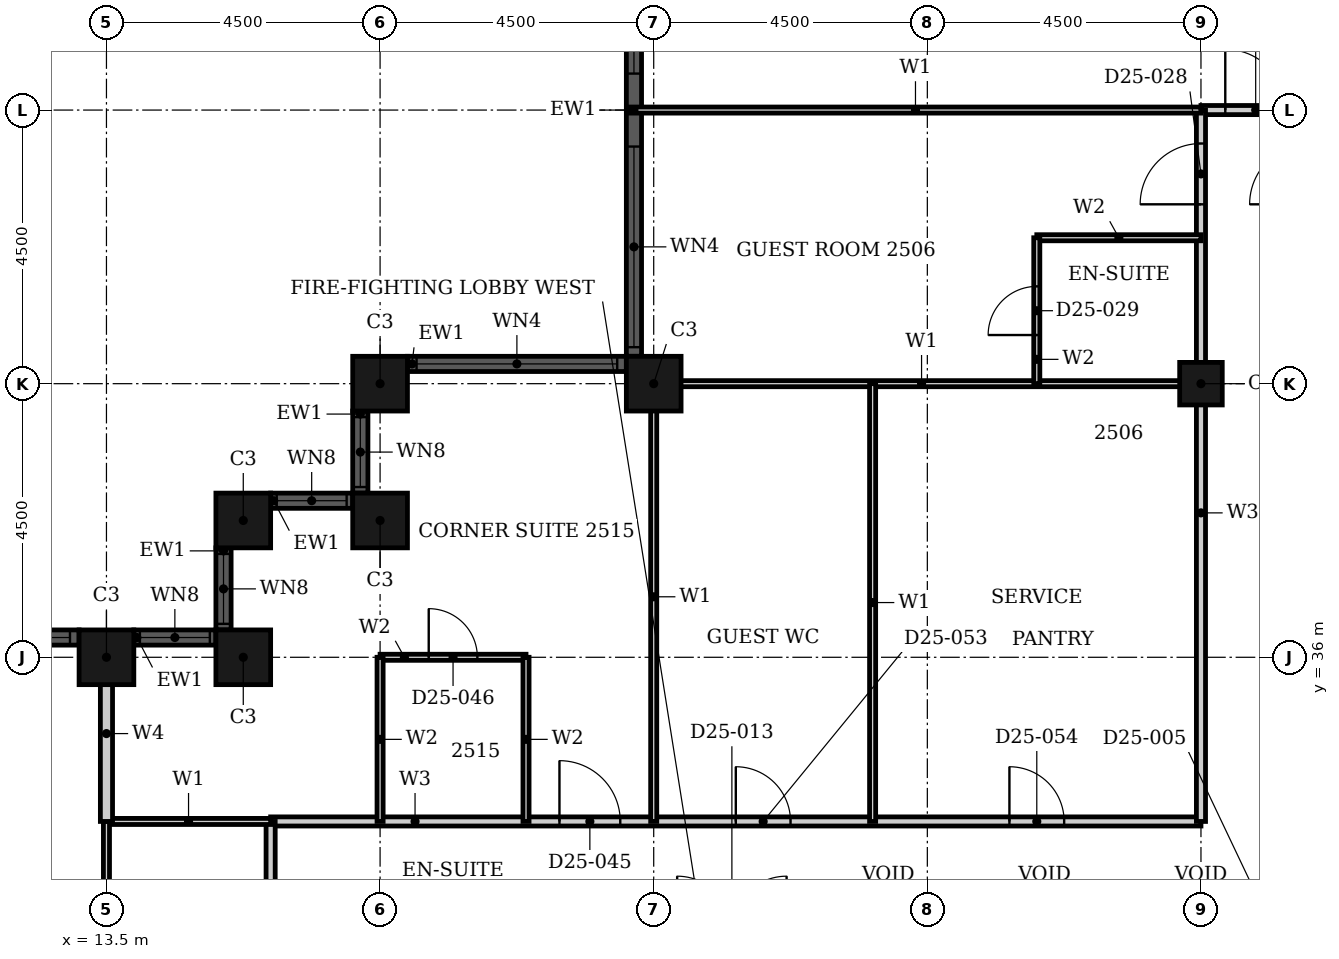
"""IFC4 building model, lengths in metres.
Left out: names, types, materials, properties, quantities, classifications, styles, units other than length and angle.
Written with IfcOpenShell. Run it as: python <this file> out.ifc"""

import sys

from ifc_helpers import new_model, si_unit, direction, frame, frame_2d, origin, origin_2d, place, context, subcontext, project, spatial, rectangle, hollow_rectangle, extrude, element, fill, save


model = new_model("IFC4")
c1 = context("Model", 3, precision=1e-05, world=origin(), true_north=direction((0.0, 1.0)))
c2 = subcontext(c1, "Body", "Model", "MODEL_VIEW")
j1 = project(units=[si_unit("LENGTHUNIT", "METRE"), si_unit("PLANEANGLEUNIT", "RADIAN")], contexts=[c1])
p1 = place(None, origin())
s1 = spatial("IfcSite", under=j1, at=p1, CompositionType="ELEMENT")
p2 = place(p1, origin())
s2 = spatial("IfcBuilding", under=s1, at=p2, CompositionType="ELEMENT")
p3 = place(p2, frame((0.0, 0.0, 104.4)))
s3 = spatial("IfcBuildingStorey", under=s2, at=p3, CompositionType="ELEMENT", Elevation=104.4)
for number, where, z_axis, x_axis in (
    (1, (22.5, 40.5, 0.0), (0.0, 0.0, 1.0), (1.0, 0.0, 0.0)),
    (2, (18.0, 40.5, 0.0), (0.0, 0.0, 1.0), (1.0, 0.0, 0.0)),
    (3, (18.0, 38.25, 0.0), (0.0, 0.0, 1.0), (1.0, 0.0, 0.0)),
    (4, (15.75, 38.25, 0.0), (0.0, 0.0, 1.0), (1.0, 0.0, 0.0)),
    (5, (15.75, 36.0, 0.0), (0.0, 0.0, 1.0), (1.0, 0.0, 0.0)),
    (6, (13.5, 36.0, 0.0), (0.0, 0.0, 1.0), (1.0, 0.0, 0.0)),
):
    element("IfcColumn", number, at=place(p3, frame(where, z_axis=z_axis, x_axis=x_axis)), inside=s3, PredefinedType="COLUMN", context=c2, shape_type="SweptSolid", body=[
        extrude(hollow_rectangle(XDim=0.9, YDim=0.9, WallThickness=0.028, at=origin_2d()), origin(), (0.0, 0.0, 1.0), 3.6),
    ])
p4 = place(p3, frame((31.5, 40.5, 0.0), z_axis=(0.0, 0.0, 1.0), x_axis=(1.0, 0.0, 0.0)))
e7 = element("IfcColumn", 7, at=p4, inside=s3, PredefinedType="COLUMN", context=c2, shape_type="SweptSolid", body=[
    extrude(hollow_rectangle(XDim=0.7, YDim=0.7, WallThickness=0.022, at=origin_2d()), origin(), (0.0, 0.0, 1.0), 3.6),
])
p5 = place(p3, frame((22.175, 49.05, 0.0), z_axis=(0.0, 0.0, 1.0), x_axis=(0.0, -1.0, 0.0)))
e8 = element("IfcWall", 8, at=p5, inside=s3, PredefinedType="SOLIDWALL", context=c2, shape_type="SweptSolid", body=[
    extrude(rectangle(XDim=8.1, YDim=0.25, at=frame_2d((4.05, 0.0))), origin(), (0.0, 0.0, 1.0), 3.6),
])
p6 = place(p5, frame((0.15, 0.0, 0.9)))
e9 = element("IfcOpeningElement", 9, at=p6, cuts=e8, PredefinedType="OPENING", context=c2, shape_type="SweptSolid", body=[
    extrude(rectangle(XDim=3.3, YDim=2.08, at=frame_2d((1.65, 1.04))), frame((0.0, 0.135, 0.0), z_axis=(0.0, -1.0, 0.0), x_axis=(1.0, 0.0, 0.0)), (0.0, 0.0, 1.0), 0.27),
])
p7 = place(p5, frame((4.65, 0.0, 0.9)))
e10 = element("IfcOpeningElement", 10, at=p7, cuts=e8, PredefinedType="OPENING", context=c2, shape_type="SweptSolid", body=[
    extrude(rectangle(XDim=3.3, YDim=2.08, at=frame_2d((1.65, 1.04))), frame((0.0, 0.135, 0.0), z_axis=(0.0, -1.0, 0.0), x_axis=(1.0, 0.0, 0.0)), (0.0, 0.0, 1.0), 0.27),
])
p8 = place(p3, frame((22.05, 40.825, 0.0), z_axis=(0.0, 0.0, 1.0), x_axis=(-1.0, 0.0, 0.0)))
e11 = element("IfcWall", 11, at=p8, inside=s3, PredefinedType="SOLIDWALL", context=c2, shape_type="SweptSolid", body=[
    extrude(rectangle(XDim=3.6, YDim=0.25, at=frame_2d((1.8, 0.0))), origin(), (0.0, 0.0, 1.0), 3.6),
])
p9 = place(p8, frame((0.15, 0.0, 0.9)))
e12 = element("IfcOpeningElement", 12, at=p9, cuts=e11, PredefinedType="OPENING", context=c2, shape_type="SweptSolid", body=[
    extrude(rectangle(XDim=3.3, YDim=2.08, at=frame_2d((1.65, 1.04))), frame((0.0, 0.135, 0.0), z_axis=(0.0, -1.0, 0.0), x_axis=(1.0, 0.0, 0.0)), (0.0, 0.0, 1.0), 0.27),
])
p10 = place(p3, frame((17.675, 40.05, 0.0), z_axis=(0.0, 0.0, 1.0), x_axis=(0.0, -1.0, 0.0)))
e13 = element("IfcWall", 13, at=p10, inside=s3, PredefinedType="SOLIDWALL", context=c2, shape_type="SweptSolid", body=[
    extrude(rectangle(XDim=1.35, YDim=0.25, at=frame_2d((0.675, 0.0))), origin(), (0.0, 0.0, 1.0), 3.6),
])
p11 = place(p10, frame((0.1, 0.0, 0.9)))
e14 = element("IfcOpeningElement", 14, at=p11, cuts=e13, PredefinedType="OPENING", context=c2, shape_type="SweptSolid", body=[
    extrude(rectangle(XDim=1.15, YDim=2.08, at=frame_2d((0.575, 1.04))), frame((0.0, 0.135, 0.0), z_axis=(0.0, -1.0, 0.0), x_axis=(1.0, 0.0, 0.0)), (0.0, 0.0, 1.0), 0.27),
])
p12 = place(p3, frame((17.55, 38.575, 0.0), z_axis=(0.0, 0.0, 1.0), x_axis=(-1.0, 0.0, 0.0)))
e15 = element("IfcWall", 15, at=p12, inside=s3, PredefinedType="SOLIDWALL", context=c2, shape_type="SweptSolid", body=[
    extrude(rectangle(XDim=1.35, YDim=0.25, at=frame_2d((0.675, 0.0))), origin(), (0.0, 0.0, 1.0), 3.6),
])
p13 = place(p12, frame((0.1, 0.0, 0.9)))
e16 = element("IfcOpeningElement", 16, at=p13, cuts=e15, PredefinedType="OPENING", context=c2, shape_type="SweptSolid", body=[
    extrude(rectangle(XDim=1.15, YDim=2.08, at=frame_2d((0.575, 1.04))), frame((0.0, 0.135, 0.0), z_axis=(0.0, -1.0, 0.0), x_axis=(1.0, 0.0, 0.0)), (0.0, 0.0, 1.0), 0.27),
])
p14 = place(p3, frame((15.425, 37.8, 0.0), z_axis=(0.0, 0.0, 1.0), x_axis=(0.0, -1.0, 0.0)))
e17 = element("IfcWall", 17, at=p14, inside=s3, PredefinedType="SOLIDWALL", context=c2, shape_type="SweptSolid", body=[
    extrude(rectangle(XDim=1.35, YDim=0.25, at=frame_2d((0.675, 0.0))), origin(), (0.0, 0.0, 1.0), 3.6),
])
p15 = place(p14, frame((0.1, 0.0, 0.9)))
e18 = element("IfcOpeningElement", 18, at=p15, cuts=e17, PredefinedType="OPENING", context=c2, shape_type="SweptSolid", body=[
    extrude(rectangle(XDim=1.15, YDim=2.08, at=frame_2d((0.575, 1.04))), frame((0.0, 0.135, 0.0), z_axis=(0.0, -1.0, 0.0), x_axis=(1.0, 0.0, 0.0)), (0.0, 0.0, 1.0), 0.27),
])
p16 = place(p3, frame((15.3, 36.325, 0.0), z_axis=(0.0, 0.0, 1.0), x_axis=(-1.0, 0.0, 0.0)))
e19 = element("IfcWall", 19, at=p16, inside=s3, PredefinedType="SOLIDWALL", context=c2, shape_type="SweptSolid", body=[
    extrude(rectangle(XDim=1.35, YDim=0.25, at=frame_2d((0.675, 0.0))), origin(), (0.0, 0.0, 1.0), 3.6),
])
p17 = place(p16, frame((0.1, 0.0, 0.9)))
e20 = element("IfcOpeningElement", 20, at=p17, cuts=e19, PredefinedType="OPENING", context=c2, shape_type="SweptSolid", body=[
    extrude(rectangle(XDim=1.15, YDim=2.08, at=frame_2d((0.575, 1.04))), frame((0.0, 0.135, 0.0), z_axis=(0.0, -1.0, 0.0), x_axis=(1.0, 0.0, 0.0)), (0.0, 0.0, 1.0), 0.27),
])
p18 = place(p3, frame((13.05, 36.325, 0.0), z_axis=(0.0, 0.0, 1.0), x_axis=(-1.0, 0.0, 0.0)))
e21 = element("IfcWall", 21, at=p18, inside=s3, PredefinedType="SOLIDWALL", context=c2, shape_type="SweptSolid", body=[
    extrude(rectangle(XDim=8.1, YDim=0.25, at=frame_2d((4.05, 0.0))), origin(), (0.0, 0.0, 1.0), 3.6),
])
p19 = place(p18, frame((0.15, 0.0, 0.9)))
e22 = element("IfcOpeningElement", 22, at=p19, cuts=e21, PredefinedType="OPENING", context=c2, shape_type="SweptSolid", body=[
    extrude(rectangle(XDim=3.3, YDim=2.08, at=frame_2d((1.65, 1.04))), frame((0.0, 0.135, 0.0), z_axis=(0.0, -1.0, 0.0), x_axis=(1.0, 0.0, 0.0)), (0.0, 0.0, 1.0), 0.27),
])
p20 = place(p18, frame((4.65, 0.0, 0.9)))
e23 = element("IfcOpeningElement", 23, at=p20, cuts=e21, PredefinedType="OPENING", context=c2, shape_type="SweptSolid", body=[
    extrude(rectangle(XDim=3.3, YDim=2.08, at=frame_2d((1.65, 1.04))), frame((0.0, 0.135, 0.0), z_axis=(0.0, -1.0, 0.0), x_axis=(1.0, 0.0, 0.0)), (0.0, 0.0, 1.0), 0.27),
])
p21 = place(p3, frame((16.2, 33.3, 0.0), z_axis=(0.0, 0.0, 1.0), x_axis=(1.0, 0.0, 0.0)))
e24 = element("IfcWall", 24, at=p21, inside=s3, PredefinedType="PARTITIONING", context=c2, shape_type="SweptSolid", body=[
    extrude(rectangle(XDim=15.3, YDim=0.15, at=frame_2d((7.65, 0.0))), origin(), (0.0, 0.0, 1.0), 3.3),
])
p22 = place(p21, frame((4.75, 0.0, 0.0)))
e25 = element("IfcOpeningElement", 25, at=p22, cuts=e24, PredefinedType="OPENING", context=c2, shape_type="SweptSolid", body=[
    extrude(rectangle(XDim=1.0, YDim=2.1, at=frame_2d((0.5, 1.05))), frame((0.0, 0.085, 0.0), z_axis=(0.0, -1.0, 0.0), x_axis=(1.0, 0.0, 0.0)), (0.0, 0.0, 1.0), 0.17),
])
p23 = place(p21, frame((7.65, 0.0, 0.0)))
e26 = element("IfcOpeningElement", 26, at=p23, cuts=e24, PredefinedType="OPENING", context=c2, shape_type="SweptSolid", body=[
    extrude(rectangle(XDim=0.9, YDim=2.1, at=frame_2d((0.45, 1.05))), frame((0.0, 0.085, 0.0), z_axis=(0.0, -1.0, 0.0), x_axis=(1.0, 0.0, 0.0)), (0.0, 0.0, 1.0), 0.17),
])
p24 = place(p21, frame((12.15, 0.0, 0.0)))
e27 = element("IfcOpeningElement", 27, at=p24, cuts=e24, PredefinedType="OPENING", context=c2, shape_type="SweptSolid", body=[
    extrude(rectangle(XDim=0.9, YDim=2.1, at=frame_2d((0.45, 1.05))), frame((0.0, 0.085, 0.0), z_axis=(0.0, -1.0, 0.0), x_axis=(1.0, 0.0, 0.0)), (0.0, 0.0, 1.0), 0.17),
])
p25 = place(p3, frame((31.5, 45.0, 0.0), z_axis=(0.0, 0.0, 1.0), x_axis=(1.0, 0.0, 0.0)))
e28 = element("IfcWall", 28, at=p25, inside=s3, PredefinedType="PARTITIONING", context=c2, shape_type="SweptSolid", body=[
    extrude(rectangle(XDim=1.8, YDim=0.15, at=frame_2d((0.9, 0.0))), origin(), (0.0, 0.0, 1.0), 3.3),
])
p26 = place(p25, frame((0.4, 0.0, 0.0)))
e29 = element("IfcOpeningElement", 29, at=p26, cuts=e28, PredefinedType="OPENING", context=c2, shape_type="SweptSolid", body=[
    extrude(rectangle(XDim=1.0, YDim=2.1, at=frame_2d((0.5, 1.05))), frame((0.0, 0.085, 0.0), z_axis=(0.0, -1.0, 0.0), x_axis=(1.0, 0.0, 0.0)), (0.0, 0.0, 1.0), 0.17),
])
p27 = place(p3, frame((16.2, 27.0, 0.0), z_axis=(0.0, 0.0, 1.0), x_axis=(0.0, 1.0, 0.0)))
e30 = element("IfcWall", 30, at=p27, inside=s3, PredefinedType="PARTITIONING", context=c2, shape_type="SweptSolid", body=[
    extrude(rectangle(XDim=6.3, YDim=0.15, at=frame_2d((3.15, 0.0))), origin(), (0.0, 0.0, 1.0), 3.3),
])
p28 = place(p27, frame((2.55, 0.0, 0.0)))
e31 = element("IfcOpeningElement", 31, at=p28, cuts=e30, PredefinedType="OPENING", context=c2, shape_type="SweptSolid", body=[
    extrude(rectangle(XDim=0.9, YDim=2.1, at=frame_2d((0.45, 1.05))), frame((0.0, 0.085, 0.0), z_axis=(0.0, -1.0, 0.0), x_axis=(1.0, 0.0, 0.0)), (0.0, 0.0, 1.0), 0.17),
])
p29 = place(p3, frame((31.5, 33.3, 0.0), z_axis=(0.0, 0.0, 1.0), x_axis=(0.0, 1.0, 0.0)))
e32 = element("IfcWall", 32, at=p29, inside=s3, PredefinedType="PARTITIONING", context=c2, shape_type="SweptSolid", body=[
    extrude(rectangle(XDim=11.7, YDim=0.15, at=frame_2d((5.85, 0.0))), origin(), (0.0, 0.0, 1.0), 2.58),
])
p30 = place(p29, frame((10.15, 0.0, 0.0)))
e33 = element("IfcOpeningElement", 33, at=p30, cuts=e32, PredefinedType="OPENING", context=c2, shape_type="SweptSolid", body=[
    extrude(rectangle(XDim=1.0, YDim=2.1, at=frame_2d((0.5, 1.05))), frame((0.0, 0.085, 0.0), z_axis=(0.0, -1.0, 0.0), x_axis=(1.0, 0.0, 0.0)), (0.0, 0.0, 1.0), 0.17),
])
p31 = place(p3, frame((13.5, 33.3, 0.0), z_axis=(0.0, 0.0, 1.0), x_axis=(1.0, 0.0, 0.0)))
e34 = element("IfcWall", 34, at=p31, inside=s3, PredefinedType="PARTITIONING", context=c2, shape_type="SweptSolid", body=[
    extrude(rectangle(XDim=2.7, YDim=0.1, at=frame_2d((1.35, 0.0))), origin(), (0.0, 0.0, 1.0), 3.3),
])
p32 = place(p3, frame((22.31, 40.5, 0.0), z_axis=(0.0, 0.0, 1.0), x_axis=(1.0, 0.0, 0.0)))
e35 = element("IfcWall", 35, at=p32, inside=s3, PredefinedType="PARTITIONING", context=c2, shape_type="SweptSolid", body=[
    extrude(rectangle(XDim=9.19, YDim=0.1, at=frame_2d((4.595, 0.0))), origin(), (0.0, 0.0, 1.0), 2.38),
])
p33 = place(p3, frame((22.11, 45.0, 0.0), z_axis=(0.0, 0.0, 1.0), x_axis=(1.0, 0.0, 0.0)))
e36 = element("IfcWall", 36, at=p33, inside=s3, PredefinedType="PARTITIONING", context=c2, shape_type="SweptSolid", body=[
    extrude(rectangle(XDim=9.39, YDim=0.1, at=frame_2d((4.695, 0.0))), origin(), (0.0, 0.0, 1.0), 3.3),
])
p34 = place(p3, frame((13.5, 27.0, 0.0), z_axis=(0.0, 0.0, 1.0), x_axis=(0.0, 1.0, 0.0)))
e37 = element("IfcWall", 37, at=p34, inside=s3, PredefinedType="PARTITIONING", context=c2, shape_type="SweptSolid", body=[
    extrude(rectangle(XDim=6.3, YDim=0.1, at=frame_2d((3.15, 0.0))), origin(), (0.0, 0.0, 1.0), 2.38),
])
p35 = place(p3, frame((22.5, 33.3, 0.0), z_axis=(0.0, 0.0, 1.0), x_axis=(0.0, 1.0, 0.0)))
e38 = element("IfcWall", 38, at=p35, inside=s3, PredefinedType="PARTITIONING", context=c2, shape_type="SweptSolid", body=[
    extrude(rectangle(XDim=7.39, YDim=0.1, at=frame_2d((3.695, 0.0))), origin(), (0.0, 0.0, 1.0), 3.3),
])
p36 = place(p3, frame((26.1, 33.3, 0.0), z_axis=(0.0, 0.0, 1.0), x_axis=(0.0, 1.0, 0.0)))
e39 = element("IfcWall", 39, at=p36, inside=s3, PredefinedType="PARTITIONING", context=c2, shape_type="SweptSolid", body=[
    extrude(rectangle(XDim=7.2, YDim=0.1, at=frame_2d((3.6, 0.0))), origin(), (0.0, 0.0, 1.0), 3.3),
])
p37 = place(p3, frame((13.5, 33.3, 0.0), z_axis=(0.0, 0.0, 1.0), x_axis=(0.0, 1.0, 0.0)))
e40 = element("IfcWall", 40, at=p37, inside=s3, PredefinedType="PARTITIONING", context=c2, shape_type="SweptSolid", body=[
    extrude(rectangle(XDim=2.89, YDim=0.2, at=frame_2d((1.445, 0.0))), origin(), (0.0, 0.0, 1.0), 2.38),
])
p38 = place(p3, frame((18.0, 36.0, 0.0), z_axis=(0.0, 0.0, 1.0), x_axis=(1.0, 0.0, 0.0)))
e41 = element("IfcWall", 41, at=p38, inside=s3, PredefinedType="PARTITIONING", context=c2, shape_type="SweptSolid", body=[
    extrude(rectangle(XDim=2.4, YDim=0.1, at=frame_2d((1.2, 0.0))), origin(), (0.0, 0.0, 1.0), 3.3),
])
p39 = place(p38, frame((0.8, 0.0, 0.0)))
e42 = element("IfcOpeningElement", 42, at=p39, cuts=e41, PredefinedType="OPENING", context=c2, shape_type="SweptSolid", body=[
    extrude(rectangle(XDim=0.8, YDim=2.1, at=frame_2d((0.4, 1.05))), frame((0.0, 0.06, 0.0), z_axis=(0.0, -1.0, 0.0), x_axis=(1.0, 0.0, 0.0)), (0.0, 0.0, 1.0), 0.12),
])
for number, where, z_axis, x_axis in (
    (43, (28.8, 42.9, 0.0), (0.0, 0.0, 1.0), (1.0, 0.0, 0.0)),
    (44, (18.0, 33.3, 0.0), (0.0, 0.0, 1.0), (0.0, 1.0, 0.0)),
    (45, (20.4, 33.3, 0.0), (0.0, 0.0, 1.0), (0.0, 1.0, 0.0)),
):
    element("IfcWall", number, at=place(p3, frame(where, z_axis=z_axis, x_axis=x_axis)), inside=s3, PredefinedType="PARTITIONING", context=c2, shape_type="SweptSolid", body=[
        extrude(rectangle(XDim=2.7, YDim=0.1, at=frame_2d((1.35, 0.0))), origin(), (0.0, 0.0, 1.0), 3.3),
    ])
p40 = place(p3, frame((28.8, 40.5, 0.0), z_axis=(0.0, 0.0, 1.0), x_axis=(0.0, 1.0, 0.0)))
e46 = element("IfcWall", 46, at=p40, inside=s3, PredefinedType="PARTITIONING", context=c2, shape_type="SweptSolid", body=[
    extrude(rectangle(XDim=2.4, YDim=0.1, at=frame_2d((1.2, 0.0))), origin(), (0.0, 0.0, 1.0), 3.3),
])
p41 = place(p40, frame((0.8, 0.0, 0.0)))
e47 = element("IfcOpeningElement", 47, at=p41, cuts=e46, PredefinedType="OPENING", context=c2, shape_type="SweptSolid", body=[
    extrude(rectangle(XDim=0.8, YDim=2.1, at=frame_2d((0.4, 1.05))), frame((0.0, 0.06, 0.0), z_axis=(0.0, -1.0, 0.0), x_axis=(1.0, 0.0, 0.0)), (0.0, 0.0, 1.0), 0.12),
])
p42 = place(p6, origin())
e48 = element("IfcWindow", 48, at=p42, inside=s3, PartitioningType="SINGLE_PANEL", PredefinedType="WINDOW", context=c2, shape_type="SweptSolid", body=[
    extrude(rectangle(XDim=3.3, YDim=2.08, at=frame_2d((1.65, 1.04))), frame((0.0, 0.03, 0.0), z_axis=(0.0, -1.0, 0.0), x_axis=(1.0, 0.0, 0.0)), (0.0, 0.0, 1.0), 0.06),
])
fill(e9, e48)
p43 = place(p7, origin())
e49 = element("IfcWindow", 49, at=p43, inside=s3, PartitioningType="SINGLE_PANEL", PredefinedType="WINDOW", context=c2, shape_type="SweptSolid", body=[
    extrude(rectangle(XDim=3.3, YDim=2.08, at=frame_2d((1.65, 1.04))), frame((0.0, 0.03, 0.0), z_axis=(0.0, -1.0, 0.0), x_axis=(1.0, 0.0, 0.0)), (0.0, 0.0, 1.0), 0.06),
])
fill(e10, e49)
p44 = place(p9, origin())
e50 = element("IfcWindow", 50, at=p44, inside=s3, PartitioningType="SINGLE_PANEL", PredefinedType="WINDOW", context=c2, shape_type="SweptSolid", body=[
    extrude(rectangle(XDim=3.3, YDim=2.08, at=frame_2d((1.65, 1.04))), frame((0.0, 0.03, 0.0), z_axis=(0.0, -1.0, 0.0), x_axis=(1.0, 0.0, 0.0)), (0.0, 0.0, 1.0), 0.06),
])
fill(e12, e50)
p45 = place(p11, origin())
e51 = element("IfcWindow", 51, at=p45, inside=s3, PartitioningType="SINGLE_PANEL", PredefinedType="WINDOW", context=c2, shape_type="SweptSolid", body=[
    extrude(rectangle(XDim=1.15, YDim=2.08, at=frame_2d((0.575, 1.04))), frame((0.0, 0.03, 0.0), z_axis=(0.0, -1.0, 0.0), x_axis=(1.0, 0.0, 0.0)), (0.0, 0.0, 1.0), 0.06),
])
fill(e14, e51)
p46 = place(p13, origin())
e52 = element("IfcWindow", 52, at=p46, inside=s3, PartitioningType="SINGLE_PANEL", PredefinedType="WINDOW", context=c2, shape_type="SweptSolid", body=[
    extrude(rectangle(XDim=1.15, YDim=2.08, at=frame_2d((0.575, 1.04))), frame((0.0, 0.03, 0.0), z_axis=(0.0, -1.0, 0.0), x_axis=(1.0, 0.0, 0.0)), (0.0, 0.0, 1.0), 0.06),
])
fill(e16, e52)
p47 = place(p15, origin())
e53 = element("IfcWindow", 53, at=p47, inside=s3, PartitioningType="SINGLE_PANEL", PredefinedType="WINDOW", context=c2, shape_type="SweptSolid", body=[
    extrude(rectangle(XDim=1.15, YDim=2.08, at=frame_2d((0.575, 1.04))), frame((0.0, 0.03, 0.0), z_axis=(0.0, -1.0, 0.0), x_axis=(1.0, 0.0, 0.0)), (0.0, 0.0, 1.0), 0.06),
])
fill(e18, e53)
p48 = place(p17, origin())
e54 = element("IfcWindow", 54, at=p48, inside=s3, PartitioningType="SINGLE_PANEL", PredefinedType="WINDOW", context=c2, shape_type="SweptSolid", body=[
    extrude(rectangle(XDim=1.15, YDim=2.08, at=frame_2d((0.575, 1.04))), frame((0.0, 0.03, 0.0), z_axis=(0.0, -1.0, 0.0), x_axis=(1.0, 0.0, 0.0)), (0.0, 0.0, 1.0), 0.06),
])
fill(e20, e54)
p49 = place(p19, origin())
e55 = element("IfcWindow", 55, at=p49, inside=s3, PartitioningType="SINGLE_PANEL", PredefinedType="WINDOW", context=c2, shape_type="SweptSolid", body=[
    extrude(rectangle(XDim=3.3, YDim=2.08, at=frame_2d((1.65, 1.04))), frame((0.0, 0.03, 0.0), z_axis=(0.0, -1.0, 0.0), x_axis=(1.0, 0.0, 0.0)), (0.0, 0.0, 1.0), 0.06),
])
fill(e22, e55)
p50 = place(p30, origin())
e56 = element("IfcDoor", 56, at=p50, inside=s3, OperationType="SINGLE_SWING_RIGHT", PredefinedType="DOOR", context=c2, shape_type="SweptSolid", body=[
    extrude(rectangle(XDim=1.0, YDim=2.1, at=frame_2d((0.5, 1.05))), frame((0.0, 0.025, 0.0), z_axis=(0.0, -1.0, 0.0), x_axis=(1.0, 0.0, 0.0)), (0.0, 0.0, 1.0), 0.05),
])
fill(e33, e56)
p51 = place(p41, origin())
e57 = element("IfcDoor", 57, at=p51, inside=s3, OperationType="SINGLE_SWING_RIGHT", PredefinedType="DOOR", context=c2, shape_type="SweptSolid", body=[
    extrude(rectangle(XDim=0.8, YDim=2.1, at=frame_2d((0.4, 1.05))), frame((0.0, 0.025, 0.0), z_axis=(0.0, -1.0, 0.0), x_axis=(1.0, 0.0, 0.0)), (0.0, 0.0, 1.0), 0.05),
])
fill(e47, e57)
p52 = place(p26, origin())
e58 = element("IfcDoor", 58, at=p52, inside=s3, OperationType="SINGLE_SWING_RIGHT", PredefinedType="DOOR", context=c2, shape_type="SweptSolid", body=[
    extrude(rectangle(XDim=1.0, YDim=2.1, at=frame_2d((0.5, 1.05))), frame((0.0, 0.025, 0.0), z_axis=(0.0, -1.0, 0.0), x_axis=(1.0, 0.0, 0.0)), (0.0, 0.0, 1.0), 0.05),
])
fill(e29, e58)
p53 = place(p22, origin())
e59 = element("IfcDoor", 59, at=p53, inside=s3, OperationType="SINGLE_SWING_RIGHT", PredefinedType="DOOR", context=c2, shape_type="SweptSolid", body=[
    extrude(rectangle(XDim=1.0, YDim=2.1, at=frame_2d((0.5, 1.05))), frame((0.0, 0.025, 0.0), z_axis=(0.0, -1.0, 0.0), x_axis=(1.0, 0.0, 0.0)), (0.0, 0.0, 1.0), 0.05),
])
fill(e25, e59)
p54 = place(p39, origin())
e60 = element("IfcDoor", 60, at=p54, inside=s3, OperationType="SINGLE_SWING_LEFT", PredefinedType="DOOR", context=c2, shape_type="SweptSolid", body=[
    extrude(rectangle(XDim=0.8, YDim=2.1, at=frame_2d((0.4, 1.05))), frame((0.0, 0.025, 0.0), z_axis=(0.0, -1.0, 0.0), x_axis=(1.0, 0.0, 0.0)), (0.0, 0.0, 1.0), 0.05),
])
fill(e42, e60)
p55 = place(p23, origin())
e61 = element("IfcDoor", 61, at=p55, inside=s3, OperationType="SINGLE_SWING_RIGHT", PredefinedType="DOOR", context=c2, shape_type="SweptSolid", body=[
    extrude(rectangle(XDim=0.9, YDim=2.1, at=frame_2d((0.45, 1.05))), frame((0.0, 0.025, 0.0), z_axis=(0.0, -1.0, 0.0), x_axis=(1.0, 0.0, 0.0)), (0.0, 0.0, 1.0), 0.05),
])
fill(e26, e61)
p56 = place(p24, origin())
e62 = element("IfcDoor", 62, at=p56, inside=s3, OperationType="SINGLE_SWING_LEFT", PredefinedType="DOOR", context=c2, shape_type="SweptSolid", body=[
    extrude(rectangle(XDim=0.9, YDim=2.1, at=frame_2d((0.45, 1.05))), frame((0.0, 0.025, 0.0), z_axis=(0.0, -1.0, 0.0), x_axis=(1.0, 0.0, 0.0)), (0.0, 0.0, 1.0), 0.05),
])
fill(e27, e62)
save(model, sys.argv[1])
